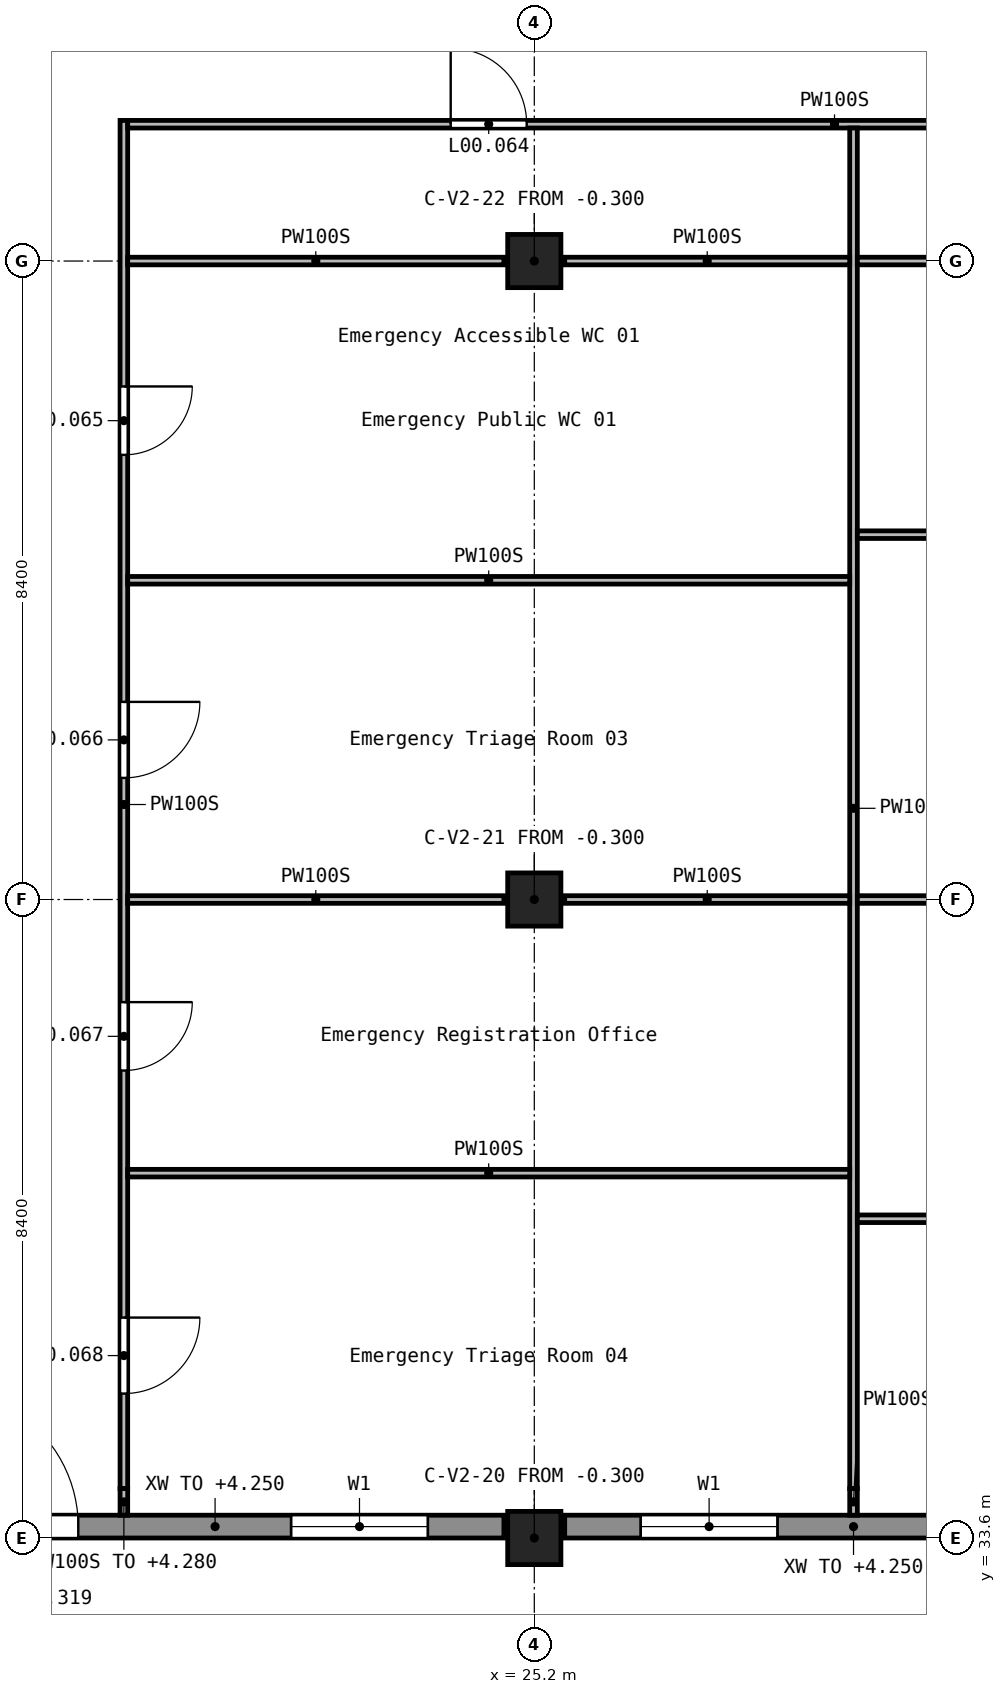
"""IFC4 building model, lengths in metres.
Left out: names, types, materials, properties, quantities, classifications, styles, units other than length and angle.
Written with IfcOpenShell. Run it as: python <this file> out.ifc"""

import sys

from ifc_helpers import new_model, si_unit, direction, frame, frame_2d, origin, origin_2d, place, context, subcontext, project, spatial, rectangle, extrude, element, fill, save


model = new_model("IFC4")
c1 = context("Model", 3, precision=1e-05, world=origin(), true_north=direction((0.0, 1.0)))
c2 = subcontext(c1, "Body", "Model", "MODEL_VIEW")
j1 = project(units=[si_unit("LENGTHUNIT", "METRE"), si_unit("PLANEANGLEUNIT", "RADIAN")], contexts=[c1])
p1 = place(None, origin())
s1 = spatial("IfcSite", under=j1, at=p1, CompositionType="ELEMENT")
p2 = place(p1, origin())
s2 = spatial("IfcBuilding", under=s1, at=p2, CompositionType="ELEMENT")
p3 = place(p2, origin())
s3 = spatial("IfcBuildingStorey", under=s2, at=p3, CompositionType="ELEMENT", Elevation=0.0)
for number, where, z_axis, x_axis in (
    (1, (25.2, 33.6, -0.3), (0.0, 0.0, 1.0), (1.0, 0.0, 0.0)),
    (2, (25.2, 42.0, -0.3), (0.0, 0.0, 1.0), (1.0, 0.0, 0.0)),
    (3, (25.2, 50.4, -0.3), (0.0, 0.0, 1.0), (1.0, 0.0, 0.0)),
):
    element("IfcColumn", number, at=place(p3, frame(where, z_axis=z_axis, x_axis=x_axis)), inside=s3, PredefinedType="COLUMN", context=c2, shape_type="SweptSolid", body=[
        extrude(rectangle(XDim=0.7, YDim=0.7, at=origin_2d()), origin(), (0.0, 0.0, 1.0), 5.7),
    ])
p4 = place(p3, frame((17.2, 33.75, 0.0), z_axis=(0.0, 0.0, 1.0), x_axis=(1.0, 0.0, 0.0)))
e4 = element("IfcWall", 4, at=p4, inside=s3, PredefinedType="STANDARD", context=c2, shape_type="SweptSolid", body=[
    extrude(rectangle(XDim=7.6, YDim=0.3, at=frame_2d((3.8, 0.0))), origin(), (0.0, 0.0, 1.0), 4.25),
])
p5 = place(p4, frame((0.2, 0.0, 0.0)))
e5 = element("IfcOpeningElement", 5, at=p5, cuts=e4, PredefinedType="OPENING", context=c2, shape_type="SweptSolid", body=[
    extrude(rectangle(XDim=1.8, YDim=2.1, at=frame_2d((0.9, 1.05))), frame((0.0, 0.16, 0.0), z_axis=(0.0, -1.0, 0.0), x_axis=(1.0, 0.0, 0.0)), (0.0, 0.0, 1.0), 0.32),
])
p6 = place(p4, frame((4.8, 0.0, 0.9)))
e6 = element("IfcOpeningElement", 6, at=p6, cuts=e4, PredefinedType="OPENING", context=c2, shape_type="SweptSolid", body=[
    extrude(rectangle(XDim=1.8, YDim=1.5, at=frame_2d((0.9, 0.75))), frame((0.0, 0.16, 0.0), z_axis=(0.0, -1.0, 0.0), x_axis=(1.0, 0.0, 0.0)), (0.0, 0.0, 1.0), 0.32),
])
p7 = place(p3, frame((25.6, 33.75, 0.0), z_axis=(0.0, 0.0, 1.0), x_axis=(1.0, 0.0, 0.0)))
e7 = element("IfcWall", 7, at=p7, inside=s3, PredefinedType="STANDARD", context=c2, shape_type="SweptSolid", body=[
    extrude(rectangle(XDim=7.6, YDim=0.3, at=frame_2d((3.8, 0.0))), origin(), (0.0, 0.0, 1.0), 4.25),
])
p8 = place(p7, frame((1.0, 0.0, 0.9)))
e8 = element("IfcOpeningElement", 8, at=p8, cuts=e7, PredefinedType="OPENING", context=c2, shape_type="SweptSolid", body=[
    extrude(rectangle(XDim=1.8, YDim=1.5, at=frame_2d((0.9, 0.75))), frame((0.0, 0.16, 0.0), z_axis=(0.0, -1.0, 0.0), x_axis=(1.0, 0.0, 0.0)), (0.0, 0.0, 1.0), 0.32),
])
p9 = place(p7, frame((4.8, 0.0, 0.9)))
e9 = element("IfcOpeningElement", 9, at=p9, cuts=e7, PredefinedType="OPENING", context=c2, shape_type="SweptSolid", body=[
    extrude(rectangle(XDim=1.8, YDim=1.5, at=frame_2d((0.9, 0.75))), frame((0.0, 0.16, 0.0), z_axis=(0.0, -1.0, 0.0), x_axis=(1.0, 0.0, 0.0)), (0.0, 0.0, 1.0), 0.32),
])
p10 = place(p3, frame((19.8, 52.25, 0.0), z_axis=(0.0, 0.0, 1.0), x_axis=(0.0, -1.0, 0.0)))
e10 = element("IfcWall", 10, at=p10, inside=s3, PredefinedType="PARTITIONING", context=c2, shape_type="SweptSolid", body=[
    extrude(rectangle(XDim=18.0, YDim=0.1, at=frame_2d((9.0, 0.0))), origin(), (0.0, 0.0, 1.0), 5.05),
])
p11 = place(p10, frame((3.5, 0.0, 0.0)))
e11 = element("IfcOpeningElement", 11, at=p11, cuts=e10, PredefinedType="OPENING", context=c2, shape_type="SweptSolid", body=[
    extrude(rectangle(XDim=0.9, YDim=2.1, at=frame_2d((0.45, 1.05))), frame((0.0, 0.06, 0.0), z_axis=(0.0, -1.0, 0.0), x_axis=(1.0, 0.0, 0.0)), (0.0, 0.0, 1.0), 0.12),
])
p12 = place(p10, frame((7.65, 0.0, 0.0)))
e12 = element("IfcOpeningElement", 12, at=p12, cuts=e10, PredefinedType="OPENING", context=c2, shape_type="SweptSolid", body=[
    extrude(rectangle(XDim=1.0, YDim=2.1, at=frame_2d((0.5, 1.05))), frame((0.0, 0.06, 0.0), z_axis=(0.0, -1.0, 0.0), x_axis=(1.0, 0.0, 0.0)), (0.0, 0.0, 1.0), 0.12),
])
p13 = place(p10, frame((11.6, 0.0, 0.0)))
e13 = element("IfcOpeningElement", 13, at=p13, cuts=e10, PredefinedType="OPENING", context=c2, shape_type="SweptSolid", body=[
    extrude(rectangle(XDim=0.9, YDim=2.1, at=frame_2d((0.45, 1.05))), frame((0.0, 0.06, 0.0), z_axis=(0.0, -1.0, 0.0), x_axis=(1.0, 0.0, 0.0)), (0.0, 0.0, 1.0), 0.12),
])
p14 = place(p10, frame((15.75, 0.0, 0.0)))
e14 = element("IfcOpeningElement", 14, at=p14, cuts=e10, PredefinedType="OPENING", context=c2, shape_type="SweptSolid", body=[
    extrude(rectangle(XDim=1.0, YDim=2.1, at=frame_2d((0.5, 1.05))), frame((0.0, 0.06, 0.0), z_axis=(0.0, -1.0, 0.0), x_axis=(1.0, 0.0, 0.0)), (0.0, 0.0, 1.0), 0.12),
])
p15 = place(p3, frame((19.8, 34.25, 0.0), z_axis=(0.0, 0.0, 1.0), x_axis=(0.0, -1.0, 0.0)))
e15 = element("IfcWall", 15, at=p15, inside=s3, PredefinedType="PARTITIONING", context=c2, shape_type="SweptSolid", body=[
    extrude(rectangle(XDim=0.35, YDim=0.1, at=frame_2d((0.175, 0.0))), origin(), (0.0, 0.0, 1.0), 4.28),
])
p16 = place(p3, frame((19.85, 52.2, 0.0), z_axis=(0.0, 0.0, 1.0), x_axis=(1.0, 0.0, 0.0)))
e16 = element("IfcWall", 16, at=p16, inside=s3, PredefinedType="PARTITIONING", context=c2, shape_type="SweptSolid", body=[
    extrude(rectangle(XDim=18.6, YDim=0.1, at=frame_2d((9.3, 0.0))), origin(), (0.0, 0.0, 1.0), 5.05),
])
p17 = place(p16, frame((4.25, 0.0, 0.0)))
e17 = element("IfcOpeningElement", 17, at=p17, cuts=e16, PredefinedType="OPENING", context=c2, shape_type="SweptSolid", body=[
    extrude(rectangle(XDim=1.0, YDim=2.1, at=frame_2d((0.5, 1.05))), frame((0.0, 0.06, 0.0), z_axis=(0.0, -1.0, 0.0), x_axis=(1.0, 0.0, 0.0)), (0.0, 0.0, 1.0), 0.12),
])
p18 = place(p16, frame((13.55, 0.0, 0.0)))
e18 = element("IfcOpeningElement", 18, at=p18, cuts=e16, PredefinedType="OPENING", context=c2, shape_type="SweptSolid", body=[
    extrude(rectangle(XDim=1.0, YDim=2.1, at=frame_2d((0.5, 1.05))), frame((0.0, 0.06, 0.0), z_axis=(0.0, -1.0, 0.0), x_axis=(1.0, 0.0, 0.0)), (0.0, 0.0, 1.0), 0.12),
])
p19 = place(p3, frame((29.4, 52.15, 0.0), z_axis=(0.0, 0.0, 1.0), x_axis=(0.0, -1.0, 0.0)))
e19 = element("IfcWall", 19, at=p19, inside=s3, PredefinedType="PARTITIONING", context=c2, shape_type="SweptSolid", body=[
    extrude(rectangle(XDim=17.9, YDim=0.1, at=frame_2d((8.95, 0.0))), origin(), (0.0, 0.0, 1.0), 5.05),
])
p20 = place(p3, frame((29.4, 34.25, 0.0), z_axis=(0.0, 0.0, 1.0), x_axis=(0.0, -1.0, 0.0)))
e20 = element("IfcWall", 20, at=p20, inside=s3, PredefinedType="PARTITIONING", context=c2, shape_type="SweptSolid", body=[
    extrude(rectangle(XDim=0.35, YDim=0.1, at=frame_2d((0.175, 0.0))), origin(), (0.0, 0.0, 1.0), 4.28),
])
p21 = place(p3, frame((19.85, 42.0, 0.0), z_axis=(0.0, 0.0, 1.0), x_axis=(1.0, 0.0, 0.0)))
e21 = element("IfcWall", 21, at=p21, inside=s3, PredefinedType="PARTITIONING", context=c2, shape_type="SweptSolid", body=[
    extrude(rectangle(XDim=4.95, YDim=0.1, at=frame_2d((2.475, 0.0))), origin(), (0.0, 0.0, 1.0), 5.05),
])
for number, where, z_axis, x_axis in (
    (22, (25.6, 42.0, 0.0), (0.0, 0.0, 1.0), (1.0, 0.0, 0.0)),
    (23, (29.45, 42.0, 0.0), (0.0, 0.0, 1.0), (1.0, 0.0, 0.0)),
):
    element("IfcWall", number, at=place(p3, frame(where, z_axis=z_axis, x_axis=x_axis)), inside=s3, PredefinedType="PARTITIONING", context=c2, shape_type="SweptSolid", body=[
        extrude(rectangle(XDim=3.75, YDim=0.1, at=frame_2d((1.875, 0.0))), origin(), (0.0, 0.0, 1.0), 5.05),
    ])
p22 = place(p3, frame((19.85, 50.4, 0.0), z_axis=(0.0, 0.0, 1.0), x_axis=(1.0, 0.0, 0.0)))
e24 = element("IfcWall", 24, at=p22, inside=s3, PredefinedType="PARTITIONING", context=c2, shape_type="SweptSolid", body=[
    extrude(rectangle(XDim=4.95, YDim=0.1, at=frame_2d((2.475, 0.0))), origin(), (0.0, 0.0, 1.0), 5.05),
])
for number, where, z_axis, x_axis in (
    (25, (25.6, 50.4, 0.0), (0.0, 0.0, 1.0), (1.0, 0.0, 0.0)),
    (26, (29.45, 50.4, 0.0), (0.0, 0.0, 1.0), (1.0, 0.0, 0.0)),
):
    element("IfcWall", number, at=place(p3, frame(where, z_axis=z_axis, x_axis=x_axis)), inside=s3, PredefinedType="PARTITIONING", context=c2, shape_type="SweptSolid", body=[
        extrude(rectangle(XDim=3.75, YDim=0.1, at=frame_2d((1.875, 0.0))), origin(), (0.0, 0.0, 1.0), 5.05),
    ])
for number, where, z_axis, x_axis in (
    (27, (19.85, 38.4, 0.0), (0.0, 0.0, 1.0), (1.0, 0.0, 0.0)),
    (28, (19.85, 46.2, 0.0), (0.0, 0.0, 1.0), (1.0, 0.0, 0.0)),
):
    element("IfcWall", number, at=place(p3, frame(where, z_axis=z_axis, x_axis=x_axis)), inside=s3, PredefinedType="PARTITIONING", context=c2, shape_type="SweptSolid", body=[
        extrude(rectangle(XDim=9.5, YDim=0.1, at=frame_2d((4.75, 0.0))), origin(), (0.0, 0.0, 1.0), 5.05),
    ])
for number, where, z_axis, x_axis in (
    (29, (29.45, 37.8, 0.0), (0.0, 0.0, 1.0), (1.0, 0.0, 0.0)),
    (30, (29.45, 46.8, 0.0), (0.0, 0.0, 1.0), (1.0, 0.0, 0.0)),
):
    element("IfcWall", number, at=place(p3, frame(where, z_axis=z_axis, x_axis=x_axis)), inside=s3, PredefinedType="PARTITIONING", context=c2, shape_type="SweptSolid", body=[
        extrude(rectangle(XDim=8.9, YDim=0.1, at=frame_2d((4.45, 0.0))), origin(), (0.0, 0.0, 1.0), 5.05),
    ])
p23 = place(p5, frame((1.8, 0.0, 0.0), z_axis=(0.0, 0.0, 1.0), x_axis=(-1.0, 0.0, 0.0)))
e31 = element("IfcDoor", 31, at=p23, inside=s3, OperationType="SINGLE_SWING_LEFT", PredefinedType="DOOR", context=c2, shape_type="SweptSolid", body=[
    extrude(rectangle(XDim=1.8, YDim=2.1, at=frame_2d((0.9, 1.05))), frame((0.0, 0.025, 0.0), z_axis=(0.0, -1.0, 0.0), x_axis=(1.0, 0.0, 0.0)), (0.0, 0.0, 1.0), 0.05),
])
fill(e5, e31)
p24 = place(p6, origin())
e32 = element("IfcWindow", 32, at=p24, inside=s3, PartitioningType="SINGLE_PANEL", PredefinedType="WINDOW", context=c2, shape_type="SweptSolid", body=[
    extrude(rectangle(XDim=1.8, YDim=1.5, at=frame_2d((0.9, 0.75))), frame((0.0, 0.03, 0.0), z_axis=(0.0, -1.0, 0.0), x_axis=(1.0, 0.0, 0.0)), (0.0, 0.0, 1.0), 0.06),
])
fill(e6, e32)
p25 = place(p8, origin())
e33 = element("IfcWindow", 33, at=p25, inside=s3, PartitioningType="SINGLE_PANEL", PredefinedType="WINDOW", context=c2, shape_type="SweptSolid", body=[
    extrude(rectangle(XDim=1.8, YDim=1.5, at=frame_2d((0.9, 0.75))), frame((0.0, 0.03, 0.0), z_axis=(0.0, -1.0, 0.0), x_axis=(1.0, 0.0, 0.0)), (0.0, 0.0, 1.0), 0.06),
])
fill(e8, e33)
p26 = place(p17, frame((1.0, 0.0, 0.0), z_axis=(0.0, 0.0, 1.0), x_axis=(-1.0, 0.0, 0.0)))
e34 = element("IfcDoor", 34, at=p26, inside=s3, OperationType="SINGLE_SWING_RIGHT", PredefinedType="DOOR", context=c2, shape_type="SweptSolid", body=[
    extrude(rectangle(XDim=1.0, YDim=2.1, at=frame_2d((0.5, 1.05))), frame((0.0, 0.025, 0.0), z_axis=(0.0, -1.0, 0.0), x_axis=(1.0, 0.0, 0.0)), (0.0, 0.0, 1.0), 0.05),
])
fill(e17, e34)
p27 = place(p11, origin())
e35 = element("IfcDoor", 35, at=p27, inside=s3, OperationType="SINGLE_SWING_LEFT", PredefinedType="DOOR", context=c2, shape_type="SweptSolid", body=[
    extrude(rectangle(XDim=0.9, YDim=2.1, at=frame_2d((0.45, 1.05))), frame((0.0, 0.025, 0.0), z_axis=(0.0, -1.0, 0.0), x_axis=(1.0, 0.0, 0.0)), (0.0, 0.0, 1.0), 0.05),
])
fill(e11, e35)
p28 = place(p12, origin())
e36 = element("IfcDoor", 36, at=p28, inside=s3, OperationType="SINGLE_SWING_LEFT", PredefinedType="DOOR", context=c2, shape_type="SweptSolid", body=[
    extrude(rectangle(XDim=1.0, YDim=2.1, at=frame_2d((0.5, 1.05))), frame((0.0, 0.025, 0.0), z_axis=(0.0, -1.0, 0.0), x_axis=(1.0, 0.0, 0.0)), (0.0, 0.0, 1.0), 0.05),
])
fill(e12, e36)
p29 = place(p13, origin())
e37 = element("IfcDoor", 37, at=p29, inside=s3, OperationType="SINGLE_SWING_RIGHT", PredefinedType="DOOR", context=c2, shape_type="SweptSolid", body=[
    extrude(rectangle(XDim=0.9, YDim=2.1, at=frame_2d((0.45, 1.05))), frame((0.0, 0.025, 0.0), z_axis=(0.0, -1.0, 0.0), x_axis=(1.0, 0.0, 0.0)), (0.0, 0.0, 1.0), 0.05),
])
fill(e13, e37)
p30 = place(p14, origin())
e38 = element("IfcDoor", 38, at=p30, inside=s3, OperationType="SINGLE_SWING_RIGHT", PredefinedType="DOOR", context=c2, shape_type="SweptSolid", body=[
    extrude(rectangle(XDim=1.0, YDim=2.1, at=frame_2d((0.5, 1.05))), frame((0.0, 0.025, 0.0), z_axis=(0.0, -1.0, 0.0), x_axis=(1.0, 0.0, 0.0)), (0.0, 0.0, 1.0), 0.05),
])
fill(e14, e38)
save(model, sys.argv[1])
